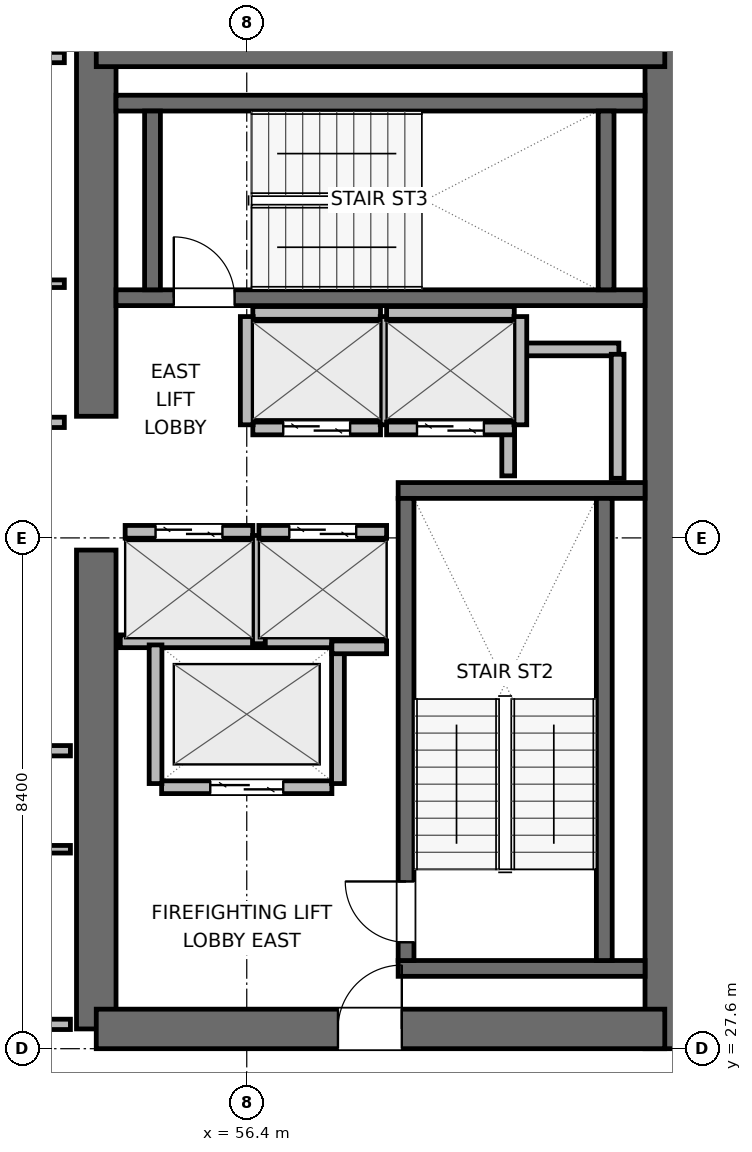
"""IFC4 building model, lengths in metres.
Left out: names, types, materials, properties, quantities, classifications, styles, units other than length and angle.
Written with IfcOpenShell. Run it as: python <this file> out.ifc"""

import sys

from ifc_helpers import new_model, si_unit, direction, frame, frame_2d, origin, place, context, subcontext, project, spatial, rectangle, extrude, element, fill, save


model = new_model("IFC4")
c1 = context("Model", 3, precision=1e-05, world=origin(), true_north=direction((0.0, 1.0)))
c2 = subcontext(c1, "Body", "Model", "MODEL_VIEW")
j1 = project(units=[si_unit("LENGTHUNIT", "METRE"), si_unit("PLANEANGLEUNIT", "RADIAN")], contexts=[c1])
p1 = place(None, origin())
s1 = spatial("IfcSite", under=j1, at=p1, CompositionType="ELEMENT")
p2 = place(p1, origin())
s2 = spatial("IfcBuilding", under=s1, at=p2, CompositionType="ELEMENT")
p3 = place(p2, frame((0.0, 0.0, 219.3)))
s3 = spatial("IfcBuildingStorey", under=s2, at=p3, CompositionType="ELEMENT", Elevation=219.3)
p4 = place(p3, frame((53.925, 27.925, 0.0), z_axis=(0.0, 0.0, 1.0), x_axis=(0.0, 1.0, 0.0)))
e1 = element("IfcWall", 1, at=p4, inside=s3, PredefinedType="SHEAR", context=c2, shape_type="SweptSolid", body=[
    extrude(rectangle(XDim=7.875, YDim=0.65, at=frame_2d((3.938, 0.0))), origin(), (0.0, 0.0, 1.0), 3.9),
])
p5 = place(p3, frame((53.925, 38.0, 0.0), z_axis=(0.0, 0.0, 1.0), x_axis=(0.0, 1.0, 0.0)))
e2 = element("IfcWall", 2, at=p5, inside=s3, PredefinedType="SHEAR", context=c2, shape_type="SweptSolid", body=[
    extrude(rectangle(XDim=6.075, YDim=0.65, at=frame_2d((3.038, 0.0))), origin(), (0.0, 0.0, 1.0), 3.9),
])
p6 = place(p3, frame((63.275, 27.6, 0.0), z_axis=(0.0, 0.0, 1.0), x_axis=(0.0, 1.0, 0.0)))
e3 = element("IfcWall", 3, at=p6, inside=s3, PredefinedType="SHEAR", context=c2, shape_type="SweptSolid", body=[
    extrude(rectangle(XDim=16.8, YDim=0.65, at=frame_2d((8.4, 0.0))), origin(), (0.0, 0.0, 1.0), 3.9),
])
p7 = place(p3, frame((53.925, 27.925, 0.0), z_axis=(0.0, 0.0, 1.0), x_axis=(1.0, 0.0, 0.0)))
e4 = element("IfcWall", 4, at=p7, inside=s3, PredefinedType="SHEAR", context=c2, shape_type="SweptSolid", body=[
    extrude(rectangle(XDim=9.35, YDim=0.65, at=frame_2d((4.675, 0.0))), origin(), (0.0, 0.0, 1.0), 3.9),
])
p8 = place(p7, frame((3.975, 0.0, 0.0)))
e5 = element("IfcOpeningElement", 5, at=p8, cuts=e4, PredefinedType="OPENING", context=c2, shape_type="SweptSolid", body=[
    extrude(rectangle(XDim=1.05, YDim=2.04, at=frame_2d((0.525, 1.02))), frame((0.0, 0.335, 0.0), z_axis=(0.0, -1.0, 0.0), x_axis=(1.0, 0.0, 0.0)), (0.0, 0.0, 1.0), 0.67),
])
p9 = place(p3, frame((53.925, 44.075, 0.0), z_axis=(0.0, 0.0, 1.0), x_axis=(1.0, 0.0, 0.0)))
e6 = element("IfcWall", 6, at=p9, inside=s3, PredefinedType="SHEAR", context=c2, shape_type="SweptSolid", body=[
    extrude(rectangle(XDim=9.35, YDim=0.65, at=frame_2d((4.675, 0.0))), origin(), (0.0, 0.0, 1.0), 3.9),
])
for number, where, z_axis, x_axis in (
    (7, (58.89, 28.92, 0.0), (0.0, 0.0, 1.0), (1.0, 0.0, 0.0)),
    (8, (58.89, 36.78, 0.0), (0.0, 0.0, 1.0), (1.0, 0.0, 0.0)),
):
    element("IfcWall", number, at=place(p3, frame(where, z_axis=z_axis, x_axis=x_axis)), inside=s3, PredefinedType="SHEAR", context=c2, shape_type="SweptSolid", body=[
        extrude(rectangle(XDim=4.06, YDim=0.26, at=frame_2d((2.03, 0.0))), origin(), (0.0, 0.0, 1.0), 3.9),
    ])
p10 = place(p3, frame((59.02, 29.05, 0.0), z_axis=(0.0, 0.0, 1.0), x_axis=(0.0, 1.0, 0.0)))
e9 = element("IfcWall", 9, at=p10, inside=s3, PredefinedType="SHEAR", context=c2, shape_type="SweptSolid", body=[
    extrude(rectangle(XDim=7.6, YDim=0.26, at=frame_2d((3.8, 0.0))), origin(), (0.0, 0.0, 1.0), 3.9),
])
p11 = place(p10, frame((0.3, 0.0, 0.0)))
e10 = element("IfcOpeningElement", 10, at=p11, cuts=e9, PredefinedType="OPENING", context=c2, shape_type="SweptSolid", body=[
    extrude(rectangle(XDim=1.0, YDim=2.04, at=frame_2d((0.5, 1.02))), frame((0.0, 0.14, 0.0), z_axis=(0.0, -1.0, 0.0), x_axis=(1.0, 0.0, 0.0)), (0.0, 0.0, 1.0), 0.28),
])
p12 = place(p3, frame((62.28, 29.05, 0.0), z_axis=(0.0, 0.0, 1.0), x_axis=(0.0, 1.0, 0.0)))
e11 = element("IfcWall", 11, at=p12, inside=s3, PredefinedType="SHEAR", context=c2, shape_type="SweptSolid", body=[
    extrude(rectangle(XDim=7.6, YDim=0.26, at=frame_2d((3.8, 0.0))), origin(), (0.0, 0.0, 1.0), 3.9),
])
p13 = place(p3, frame((54.25, 39.95, 0.0), z_axis=(0.0, 0.0, 1.0), x_axis=(1.0, 0.0, 0.0)))
e12 = element("IfcWall", 12, at=p13, inside=s3, PredefinedType="SHEAR", context=c2, shape_type="SweptSolid", body=[
    extrude(rectangle(XDim=8.7, YDim=0.26, at=frame_2d((4.35, 0.0))), origin(), (0.0, 0.0, 1.0), 3.9),
])
p14 = place(p13, frame((0.95, 0.0, 0.0)))
e13 = element("IfcOpeningElement", 13, at=p14, cuts=e12, PredefinedType="OPENING", context=c2, shape_type="SweptSolid", body=[
    extrude(rectangle(XDim=1.0, YDim=2.04, at=frame_2d((0.5, 1.02))), frame((0.0, 0.14, 0.0), z_axis=(0.0, -1.0, 0.0), x_axis=(1.0, 0.0, 0.0)), (0.0, 0.0, 1.0), 0.28),
])
p15 = place(p3, frame((54.25, 43.15, 0.0), z_axis=(0.0, 0.0, 1.0), x_axis=(1.0, 0.0, 0.0)))
e14 = element("IfcWall", 14, at=p15, inside=s3, PredefinedType="SHEAR", context=c2, shape_type="SweptSolid", body=[
    extrude(rectangle(XDim=8.7, YDim=0.26, at=frame_2d((4.35, 0.0))), origin(), (0.0, 0.0, 1.0), 3.9),
])
for number, where, z_axis, x_axis in (
    (15, (54.85, 40.08, 0.0), (0.0, 0.0, 1.0), (0.0, 1.0, 0.0)),
    (16, (62.31, 40.08, 0.0), (0.0, 0.0, 1.0), (0.0, 1.0, 0.0)),
):
    element("IfcWall", number, at=place(p3, frame(where, z_axis=z_axis, x_axis=x_axis)), inside=s3, PredefinedType="SHEAR", context=c2, shape_type="SweptSolid", body=[
        extrude(rectangle(XDim=2.94, YDim=0.26, at=frame_2d((1.47, 0.0))), origin(), (0.0, 0.0, 1.0), 3.9),
    ])
p16 = place(p3, frame((60.72, 39.1, 0.0), z_axis=(0.0, 0.0, 1.0), x_axis=(1.0, 0.0, 0.0)))
e17 = element("IfcWall", 17, at=p16, inside=s3, PredefinedType="PARTITIONING", context=c2, shape_type="SweptSolid", body=[
    extrude(rectangle(XDim=1.8, YDim=0.21, at=frame_2d((0.9, 0.0))), origin(), (0.0, 0.0, 1.0), 3.68),
])
p17 = place(p3, frame((60.7, 37.02, 0.0), z_axis=(0.0, 0.0, 1.0), x_axis=(0.0, 1.0, 0.0)))
e18 = element("IfcWall", 18, at=p17, inside=s3, PredefinedType="PARTITIONING", context=c2, shape_type="SweptSolid", body=[
    extrude(rectangle(XDim=1.96, YDim=0.21, at=frame_2d((0.98, 0.0))), origin(), (0.0, 0.0, 1.0), 3.68),
])
p18 = place(p3, frame((62.5, 36.98, 0.0), z_axis=(0.0, 0.0, 1.0), x_axis=(0.0, 1.0, 0.0)))
e19 = element("IfcWall", 19, at=p18, inside=s3, PredefinedType="PARTITIONING", context=c2, shape_type="SweptSolid", body=[
    extrude(rectangle(XDim=2.04, YDim=0.21, at=frame_2d((1.02, 0.0))), origin(), (0.0, 0.0, 1.0), 3.68),
])
p19 = place(p3, frame((55.0, 31.9, 0.0), z_axis=(0.0, 0.0, 1.0), x_axis=(1.0, 0.0, 0.0)))
e20 = element("IfcWall", 20, at=p19, inside=s3, PredefinedType="PARTITIONING", context=c2, shape_type="SweptSolid", body=[
    extrude(rectangle(XDim=2.8, YDim=0.21, at=frame_2d((1.4, 0.0))), origin(), (0.0, 0.0, 1.0), 3.68),
])
p20 = place(p19, frame((0.8, 0.0, 0.0)))
e21 = element("IfcOpeningElement", 21, at=p20, cuts=e20, PredefinedType="OPENING", context=c2, shape_type="SweptSolid", body=[
    extrude(rectangle(XDim=1.2, YDim=2.04, at=frame_2d((0.6, 1.02))), frame((0.0, 0.115, 0.0), z_axis=(0.0, -1.0, 0.0), x_axis=(1.0, 0.0, 0.0)), (0.0, 0.0, 1.0), 0.23),
])
p21 = place(p3, frame((54.32, 34.3, 0.0), z_axis=(0.0, 0.0, 1.0), x_axis=(1.0, 0.0, 0.0)))
e22 = element("IfcWall", 22, at=p21, inside=s3, PredefinedType="PARTITIONING", context=c2, shape_type="SweptSolid", body=[
    extrude(rectangle(XDim=3.48, YDim=0.21, at=frame_2d((1.74, 0.0))), origin(), (0.0, 0.0, 1.0), 3.68),
])
for number, where, z_axis, x_axis in (
    (23, (54.9, 31.96, 0.0), (0.0, 0.0, 1.0), (0.0, 1.0, 0.0)),
    (24, (57.9, 31.96, 0.0), (0.0, 0.0, 1.0), (0.0, 1.0, 0.0)),
):
    element("IfcWall", number, at=place(p3, frame(where, z_axis=z_axis, x_axis=x_axis)), inside=s3, PredefinedType="PARTITIONING", context=c2, shape_type="SweptSolid", body=[
        extrude(rectangle(XDim=2.28, YDim=0.21, at=frame_2d((1.14, 0.0))), origin(), (0.0, 0.0, 1.0), 3.68),
    ])
p22 = place(p3, frame((54.4, 36.1, 0.0), z_axis=(0.0, 0.0, 1.0), x_axis=(1.0, 0.0, 0.0)))
e25 = element("IfcWall", 25, at=p22, inside=s3, PredefinedType="PARTITIONING", context=c2, shape_type="SweptSolid", body=[
    extrude(rectangle(XDim=2.1, YDim=0.21, at=frame_2d((1.05, 0.0))), origin(), (0.0, 0.0, 1.0), 3.68),
])
p23 = place(p22, frame((0.5, 0.0, 0.0)))
e26 = element("IfcOpeningElement", 26, at=p23, cuts=e25, PredefinedType="OPENING", context=c2, shape_type="SweptSolid", body=[
    extrude(rectangle(XDim=1.1, YDim=2.04, at=frame_2d((0.55, 1.02))), frame((0.0, 0.115, 0.0), z_axis=(0.0, -1.0, 0.0), x_axis=(1.0, 0.0, 0.0)), (0.0, 0.0, 1.0), 0.23),
])
p24 = place(p3, frame((56.6, 34.26, 0.0), z_axis=(0.0, 0.0, 1.0), x_axis=(0.0, 1.0, 0.0)))
e27 = element("IfcWall", 27, at=p24, inside=s3, PredefinedType="PARTITIONING", context=c2, shape_type="SweptSolid", body=[
    extrude(rectangle(XDim=1.78, YDim=0.21, at=frame_2d((0.89, 0.0))), origin(), (0.0, 0.0, 1.0), 3.68),
])
p25 = place(p3, frame((56.6, 36.1, 0.0), z_axis=(0.0, 0.0, 1.0), x_axis=(1.0, 0.0, 0.0)))
e28 = element("IfcWall", 28, at=p25, inside=s3, PredefinedType="PARTITIONING", context=c2, shape_type="SweptSolid", body=[
    extrude(rectangle(XDim=2.1, YDim=0.21, at=frame_2d((1.05, 0.0))), origin(), (0.0, 0.0, 1.0), 3.68),
])
p26 = place(p25, frame((0.5, 0.0, 0.0)))
e29 = element("IfcOpeningElement", 29, at=p26, cuts=e28, PredefinedType="OPENING", context=c2, shape_type="SweptSolid", body=[
    extrude(rectangle(XDim=1.1, YDim=2.04, at=frame_2d((0.55, 1.02))), frame((0.0, 0.115, 0.0), z_axis=(0.0, -1.0, 0.0), x_axis=(1.0, 0.0, 0.0)), (0.0, 0.0, 1.0), 0.23),
])
p27 = place(p3, frame((57.8, 34.2, 0.0), z_axis=(0.0, 0.0, 1.0), x_axis=(1.0, 0.0, 0.0)))
e30 = element("IfcWall", 30, at=p27, inside=s3, PredefinedType="PARTITIONING", context=c2, shape_type="SweptSolid", body=[
    extrude(rectangle(XDim=0.9, YDim=0.21, at=frame_2d((0.45, 0.0))), origin(), (0.0, 0.0, 1.0), 3.68),
])
p28 = place(p3, frame((56.5, 37.8, 0.0), z_axis=(0.0, 0.0, 1.0), x_axis=(1.0, 0.0, 0.0)))
e31 = element("IfcWall", 31, at=p28, inside=s3, PredefinedType="PARTITIONING", context=c2, shape_type="SweptSolid", body=[
    extrude(rectangle(XDim=2.1, YDim=0.21, at=frame_2d((1.05, 0.0))), origin(), (0.0, 0.0, 1.0), 3.68),
])
p29 = place(p28, frame((0.5, 0.0, 0.0)))
e32 = element("IfcOpeningElement", 32, at=p29, cuts=e31, PredefinedType="OPENING", context=c2, shape_type="SweptSolid", body=[
    extrude(rectangle(XDim=1.1, YDim=2.04, at=frame_2d((0.55, 1.02))), frame((0.0, 0.115, 0.0), z_axis=(0.0, -1.0, 0.0), x_axis=(1.0, 0.0, 0.0)), (0.0, 0.0, 1.0), 0.23),
])
p30 = place(p3, frame((56.5, 39.7, 0.0), z_axis=(0.0, 0.0, 1.0), x_axis=(1.0, 0.0, 0.0)))
e33 = element("IfcWall", 33, at=p30, inside=s3, PredefinedType="PARTITIONING", context=c2, shape_type="SweptSolid", body=[
    extrude(rectangle(XDim=2.1, YDim=0.21, at=frame_2d((1.05, 0.0))), origin(), (0.0, 0.0, 1.0), 3.68),
])
for number, where, z_axis, x_axis in (
    (34, (56.4, 37.86, 0.0), (0.0, 0.0, 1.0), (0.0, 1.0, 0.0)),
    (35, (58.7, 37.86, 0.0), (0.0, 0.0, 1.0), (0.0, 1.0, 0.0)),
):
    element("IfcWall", number, at=place(p3, frame(where, z_axis=z_axis, x_axis=x_axis)), inside=s3, PredefinedType="PARTITIONING", context=c2, shape_type="SweptSolid", body=[
        extrude(rectangle(XDim=1.78, YDim=0.21, at=frame_2d((0.89, 0.0))), origin(), (0.0, 0.0, 1.0), 3.68),
    ])
p31 = place(p3, frame((58.7, 37.8, 0.0), z_axis=(0.0, 0.0, 1.0), x_axis=(1.0, 0.0, 0.0)))
e36 = element("IfcWall", 36, at=p31, inside=s3, PredefinedType="PARTITIONING", context=c2, shape_type="SweptSolid", body=[
    extrude(rectangle(XDim=2.1, YDim=0.21, at=frame_2d((1.05, 0.0))), origin(), (0.0, 0.0, 1.0), 3.68),
])
p32 = place(p31, frame((0.5, 0.0, 0.0)))
e37 = element("IfcOpeningElement", 37, at=p32, cuts=e36, PredefinedType="OPENING", context=c2, shape_type="SweptSolid", body=[
    extrude(rectangle(XDim=1.1, YDim=2.04, at=frame_2d((0.55, 1.02))), frame((0.0, 0.115, 0.0), z_axis=(0.0, -1.0, 0.0), x_axis=(1.0, 0.0, 0.0)), (0.0, 0.0, 1.0), 0.23),
])
p33 = place(p3, frame((58.7, 39.7, 0.0), z_axis=(0.0, 0.0, 1.0), x_axis=(1.0, 0.0, 0.0)))
e38 = element("IfcWall", 38, at=p33, inside=s3, PredefinedType="PARTITIONING", context=c2, shape_type="SweptSolid", body=[
    extrude(rectangle(XDim=2.1, YDim=0.21, at=frame_2d((1.05, 0.0))), origin(), (0.0, 0.0, 1.0), 3.68),
])
p34 = place(p3, frame((60.9, 37.86, 0.0), z_axis=(0.0, 0.0, 1.0), x_axis=(0.0, 1.0, 0.0)))
e39 = element("IfcWall", 39, at=p34, inside=s3, PredefinedType="PARTITIONING", context=c2, shape_type="SweptSolid", body=[
    extrude(rectangle(XDim=1.78, YDim=0.21, at=frame_2d((0.89, 0.0))), origin(), (0.0, 0.0, 1.0), 3.68),
])
p35 = place(p3, frame((49.287, 28.0, 0.0), z_axis=(0.0, 0.0, 1.0), x_axis=(1.0, 0.0, 0.0)))
e40 = element("IfcWall", 40, at=p35, inside=s3, PredefinedType="PARTITIONING", context=c2, shape_type="SweptSolid", body=[
    extrude(rectangle(XDim=4.213, YDim=0.17, at=frame_2d((2.106, 0.0))), origin(), (0.0, 0.0, 1.0), 2.765),
])
p36 = place(p3, frame((52.2, 32.5, 0.0), z_axis=(0.0, 0.0, 1.0), x_axis=(1.0, 0.0, 0.0)))
e41 = element("IfcWall", 41, at=p36, inside=s3, PredefinedType="PARTITIONING", context=c2, shape_type="SweptSolid", body=[
    extrude(rectangle(XDim=1.3, YDim=0.17, at=frame_2d((0.65, 0.0))), origin(), (0.0, 0.0, 1.0), 3.68),
])
p37 = place(p3, frame((49.287, 30.88, 0.0), z_axis=(0.0, 0.0, 1.0), x_axis=(1.0, 0.0, 0.0)))
e42 = element("IfcWall", 42, at=p37, inside=s3, PredefinedType="PARTITIONING", context=c2, shape_type="SweptSolid", body=[
    extrude(rectangle(XDim=4.213, YDim=0.125, at=frame_2d((2.106, 0.0))), origin(), (0.0, 0.0, 1.0), 3.68),
])
p38 = place(p3, frame((49.287, 37.9, 0.0), z_axis=(0.0, 0.0, 1.0), x_axis=(1.0, 0.0, 0.0)))
e43 = element("IfcWall", 43, at=p38, inside=s3, PredefinedType="PARTITIONING", context=c2, shape_type="SweptSolid", body=[
    extrude(rectangle(XDim=4.113, YDim=0.17, at=frame_2d((2.056, 0.0))), origin(), (0.0, 0.0, 1.0), 3.68),
])
p39 = place(p3, frame((49.287, 43.9, 0.0), z_axis=(0.0, 0.0, 1.0), x_axis=(1.0, 0.0, 0.0)))
e44 = element("IfcWall", 44, at=p39, inside=s3, PredefinedType="PARTITIONING", context=c2, shape_type="SweptSolid", body=[
    extrude(rectangle(XDim=4.113, YDim=0.17, at=frame_2d((2.056, 0.0))), origin(), (0.0, 0.0, 1.0), 2.765),
])
p40 = place(p3, frame((49.287, 40.18, 0.0), z_axis=(0.0, 0.0, 1.0), x_axis=(1.0, 0.0, 0.0)))
e45 = element("IfcWall", 45, at=p40, inside=s3, PredefinedType="PARTITIONING", context=c2, shape_type="SweptSolid", body=[
    extrude(rectangle(XDim=4.113, YDim=0.125, at=frame_2d((2.056, 0.0))), origin(), (0.0, 0.0, 1.0), 3.68),
])
p41 = place(p11, origin())
e46 = element("IfcDoor", 46, at=p41, inside=s3, OperationType="SINGLE_SWING_RIGHT", PredefinedType="DOOR", context=c2, shape_type="SweptSolid", body=[
    extrude(rectangle(XDim=1.0, YDim=2.04, at=frame_2d((0.5, 1.02))), frame((0.0, 0.025, 0.0), z_axis=(0.0, -1.0, 0.0), x_axis=(1.0, 0.0, 0.0)), (0.0, 0.0, 1.0), 0.05),
])
fill(e10, e46)
p42 = place(p14, origin())
e47 = element("IfcDoor", 47, at=p42, inside=s3, OperationType="SINGLE_SWING_LEFT", PredefinedType="DOOR", context=c2, shape_type="SweptSolid", body=[
    extrude(rectangle(XDim=1.0, YDim=2.04, at=frame_2d((0.5, 1.02))), frame((0.0, 0.025, 0.0), z_axis=(0.0, -1.0, 0.0), x_axis=(1.0, 0.0, 0.0)), (0.0, 0.0, 1.0), 0.05),
])
fill(e13, e47)
p43 = place(p20, origin())
e48 = element("IfcDoor", 48, at=p43, inside=s3, OperationType="DOUBLE_DOOR_SLIDING", PredefinedType="DOOR", context=c2, shape_type="SweptSolid", body=[
    extrude(rectangle(XDim=1.2, YDim=2.04, at=frame_2d((0.6, 1.02))), frame((0.0, 0.025, 0.0), z_axis=(0.0, -1.0, 0.0), x_axis=(1.0, 0.0, 0.0)), (0.0, 0.0, 1.0), 0.05),
])
fill(e21, e48)
p44 = place(p23, origin())
e49 = element("IfcDoor", 49, at=p44, inside=s3, OperationType="DOUBLE_DOOR_SLIDING", PredefinedType="DOOR", context=c2, shape_type="SweptSolid", body=[
    extrude(rectangle(XDim=1.1, YDim=2.04, at=frame_2d((0.55, 1.02))), frame((0.0, 0.025, 0.0), z_axis=(0.0, -1.0, 0.0), x_axis=(1.0, 0.0, 0.0)), (0.0, 0.0, 1.0), 0.05),
])
fill(e26, e49)
p45 = place(p26, origin())
e50 = element("IfcDoor", 50, at=p45, inside=s3, OperationType="DOUBLE_DOOR_SLIDING", PredefinedType="DOOR", context=c2, shape_type="SweptSolid", body=[
    extrude(rectangle(XDim=1.1, YDim=2.04, at=frame_2d((0.55, 1.02))), frame((0.0, 0.025, 0.0), z_axis=(0.0, -1.0, 0.0), x_axis=(1.0, 0.0, 0.0)), (0.0, 0.0, 1.0), 0.05),
])
fill(e29, e50)
p46 = place(p29, origin())
e51 = element("IfcDoor", 51, at=p46, inside=s3, OperationType="DOUBLE_DOOR_SLIDING", PredefinedType="DOOR", context=c2, shape_type="SweptSolid", body=[
    extrude(rectangle(XDim=1.1, YDim=2.04, at=frame_2d((0.55, 1.02))), frame((0.0, 0.025, 0.0), z_axis=(0.0, -1.0, 0.0), x_axis=(1.0, 0.0, 0.0)), (0.0, 0.0, 1.0), 0.05),
])
fill(e32, e51)
p47 = place(p32, origin())
e52 = element("IfcDoor", 52, at=p47, inside=s3, OperationType="DOUBLE_DOOR_SLIDING", PredefinedType="DOOR", context=c2, shape_type="SweptSolid", body=[
    extrude(rectangle(XDim=1.1, YDim=2.04, at=frame_2d((0.55, 1.02))), frame((0.0, 0.025, 0.0), z_axis=(0.0, -1.0, 0.0), x_axis=(1.0, 0.0, 0.0)), (0.0, 0.0, 1.0), 0.05),
])
fill(e37, e52)
p48 = place(p8, origin())
e53 = element("IfcDoor", 53, at=p48, inside=s3, OperationType="SINGLE_SWING_RIGHT", PredefinedType="DOOR", context=c2, shape_type="SweptSolid", body=[
    extrude(rectangle(XDim=1.05, YDim=2.04, at=frame_2d((0.525, 1.02))), frame((0.0, 0.025, 0.0), z_axis=(0.0, -1.0, 0.0), x_axis=(1.0, 0.0, 0.0)), (0.0, 0.0, 1.0), 0.05),
])
fill(e5, e53)
save(model, sys.argv[1])
